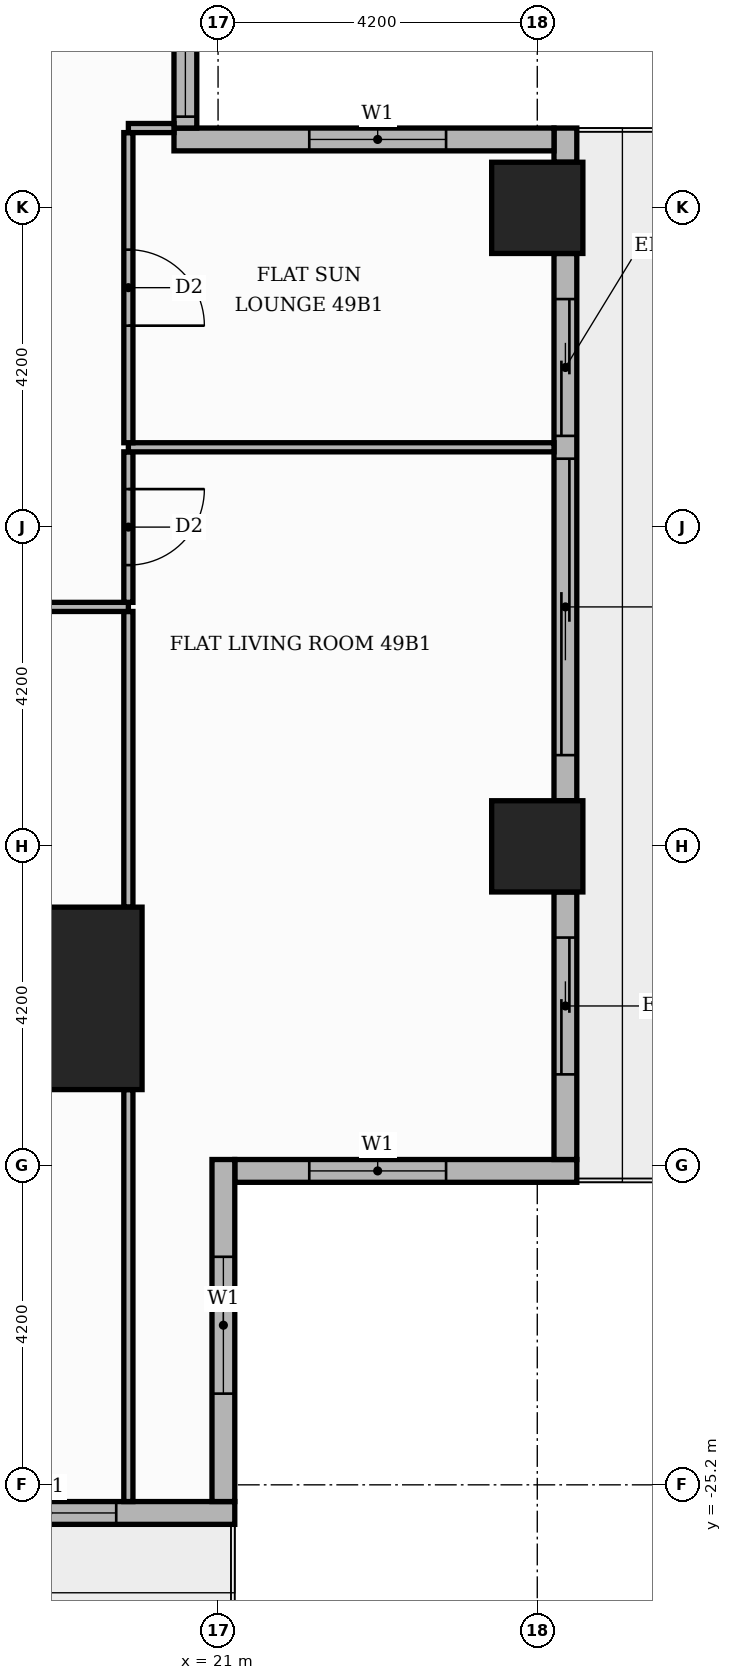
"""IFC4 building model, lengths in metres.
Left out: names, types, materials, properties, quantities, classifications, styles, units other than length and angle.
Written with IfcOpenShell. Run it as: python <this file> out.ifc"""

import sys

from ifc_helpers import new_model, si_unit, direction, frame, frame_2d, origin, origin_2d, place, context, subcontext, project, spatial, rectangle, extrude, element, fill, save


model = new_model("IFC4")
c1 = context("Model", 3, precision=1e-05, world=origin(), true_north=direction((0.0, 1.0)))
c2 = subcontext(c1, "Body", "Model", "MODEL_VIEW")
j1 = project(units=[si_unit("LENGTHUNIT", "METRE"), si_unit("PLANEANGLEUNIT", "RADIAN")], contexts=[c1])
p1 = place(None, origin())
s1 = spatial("IfcSite", under=j1, at=p1, CompositionType="ELEMENT")
p2 = place(p1, origin())
s2 = spatial("IfcBuilding", under=s1, at=p2, CompositionType="ELEMENT")
p3 = place(p2, frame((0.0, 0.0, 207.9)))
s3 = spatial("IfcBuildingStorey", under=s2, at=p3, CompositionType="ELEMENT", Elevation=207.9)
p4 = place(p3, frame((18.8, -18.8, 0.0), z_axis=(0.0, 0.0, 1.0), x_axis=(1.0, 0.0, 0.0)))
e1 = element("IfcColumn", 1, at=p4, inside=s3, PredefinedType="COLUMN", context=c2, shape_type="SweptSolid", body=[
    extrude(rectangle(XDim=2.4, YDim=2.4, at=origin_2d()), origin(), (0.0, 0.0, 1.0), 3.9),
])
for number, where, z_axis, x_axis in (
    (2, (25.2, -8.4, 0.0), (0.0, 0.0, 1.0), (1.0, 0.0, 0.0)),
    (3, (25.2, -16.8, 0.0), (0.0, 0.0, 1.0), (1.0, 0.0, 0.0)),
):
    element("IfcColumn", number, at=place(p3, frame(where, z_axis=z_axis, x_axis=x_axis)), inside=s3, PredefinedType="COLUMN", context=c2, shape_type="SweptSolid", body=[
        extrude(rectangle(XDim=1.2, YDim=1.2, at=origin_2d()), origin(), (0.0, 0.0, 1.0), 3.9),
    ])
p5 = place(p3, frame((21.22, -21.07, 0.0), z_axis=(0.0, 0.0, 1.0), x_axis=(1.0, 0.0, 0.0)))
e4 = element("IfcWall", 4, at=p5, inside=s3, PredefinedType="STANDARD", context=c2, shape_type="SweptSolid", body=[
    extrude(rectangle(XDim=4.5, YDim=0.3, at=frame_2d((2.25, 0.0))), origin(), (0.0, 0.0, 1.0), 3.48),
])
p6 = place(p5, frame((0.98, 0.0, 0.9)))
e5 = element("IfcOpeningElement", 5, at=p6, cuts=e4, PredefinedType="OPENING", context=c2, shape_type="SweptSolid", body=[
    extrude(rectangle(XDim=1.8, YDim=2.1, at=frame_2d((0.9, 1.05))), frame((0.0, 0.16, 0.0), z_axis=(0.0, -1.0, 0.0), x_axis=(1.0, 0.0, 0.0)), (0.0, 0.0, 1.0), 0.32),
])
p7 = place(p3, frame((25.57, -20.92, 0.0), z_axis=(0.0, 0.0, 1.0), x_axis=(0.0, 1.0, 0.0)))
e6 = element("IfcWall", 6, at=p7, inside=s3, PredefinedType="STANDARD", context=c2, shape_type="SweptSolid", body=[
    extrude(rectangle(XDim=3.52, YDim=0.3, at=frame_2d((1.76, 0.0))), origin(), (0.0, 0.0, 1.0), 3.48),
])
p8 = place(p7, frame((1.12, 0.0, 0.0)))
e7 = element("IfcOpeningElement", 7, at=p8, cuts=e6, PredefinedType="OPENING", context=c2, shape_type="SweptSolid", body=[
    extrude(rectangle(XDim=1.8, YDim=2.4, at=frame_2d((0.9, 1.2))), frame((0.0, 0.16, 0.0), z_axis=(0.0, -1.0, 0.0), x_axis=(1.0, 0.0, 0.0)), (0.0, 0.0, 1.0), 0.32),
])
p9 = place(p3, frame((25.57, -16.2, 0.0), z_axis=(0.0, 0.0, 1.0), x_axis=(0.0, 1.0, 0.0)))
e8 = element("IfcWall", 8, at=p9, inside=s3, PredefinedType="STANDARD", context=c2, shape_type="SweptSolid", body=[
    extrude(rectangle(XDim=7.2, YDim=0.3, at=frame_2d((3.6, 0.0))), origin(), (0.0, 0.0, 1.0), 3.48),
])
p10 = place(p9, frame((0.6, 0.0, 0.0)))
e9 = element("IfcOpeningElement", 9, at=p10, cuts=e8, PredefinedType="OPENING", context=c2, shape_type="SweptSolid", body=[
    extrude(rectangle(XDim=3.9, YDim=2.4, at=frame_2d((1.95, 1.2))), frame((0.0, 0.16, 0.0), z_axis=(0.0, -1.0, 0.0), x_axis=(1.0, 0.0, 0.0)), (0.0, 0.0, 1.0), 0.32),
])
p11 = place(p9, frame((4.8, 0.0, 0.0)))
e10 = element("IfcOpeningElement", 10, at=p11, cuts=e8, PredefinedType="OPENING", context=c2, shape_type="SweptSolid", body=[
    extrude(rectangle(XDim=1.8, YDim=2.4, at=frame_2d((0.9, 1.2))), frame((0.0, 0.16, 0.0), z_axis=(0.0, -1.0, 0.0), x_axis=(1.0, 0.0, 0.0)), (0.0, 0.0, 1.0), 0.32),
])
p12 = place(p3, frame((25.57, -7.8, 0.0), z_axis=(0.0, 0.0, 1.0), x_axis=(0.0, 1.0, 0.0)))
e11 = element("IfcWall", 11, at=p12, inside=s3, PredefinedType="STANDARD", context=c2, shape_type="SweptSolid", body=[
    extrude(rectangle(XDim=0.45, YDim=0.3, at=frame_2d((0.225, 0.0))), origin(), (0.0, 0.0, 1.0), 3.48),
])
p13 = place(p3, frame((25.42, -7.5, 0.0), z_axis=(0.0, 0.0, 1.0), x_axis=(-1.0, 0.0, 0.0)))
e12 = element("IfcWall", 12, at=p13, inside=s3, PredefinedType="STANDARD", context=c2, shape_type="SweptSolid", body=[
    extrude(rectangle(XDim=5.0, YDim=0.3, at=frame_2d((2.5, 0.0))), origin(), (0.0, 0.0, 1.0), 3.48),
])
p14 = place(p13, frame((1.42, 0.0, 0.9)))
e13 = element("IfcOpeningElement", 13, at=p14, cuts=e12, PredefinedType="OPENING", context=c2, shape_type="SweptSolid", body=[
    extrude(rectangle(XDim=1.8, YDim=2.1, at=frame_2d((0.9, 1.05))), frame((0.0, 0.16, 0.0), z_axis=(0.0, -1.0, 0.0), x_axis=(1.0, 0.0, 0.0)), (0.0, 0.0, 1.0), 0.32),
])
p15 = place(p3, frame((20.57, -7.35, 0.0), z_axis=(0.0, 0.0, 1.0), x_axis=(0.0, 1.0, 0.0)))
e14 = element("IfcWall", 14, at=p15, inside=s3, PredefinedType="STANDARD", context=c2, shape_type="SweptSolid", body=[
    extrude(rectangle(XDim=15.0, YDim=0.3, at=frame_2d((7.5, 0.0))), origin(), (0.0, 0.0, 1.0), 3.48),
])
p16 = place(p15, frame((0.15, 0.0, 0.9)))
e15 = element("IfcOpeningElement", 15, at=p16, cuts=e14, PredefinedType="OPENING", context=c2, shape_type="SweptSolid", body=[
    extrude(rectangle(XDim=6.0, YDim=2.1, at=frame_2d((3.0, 1.05))), frame((0.0, 0.16, 0.0), z_axis=(0.0, -1.0, 0.0), x_axis=(1.0, 0.0, 0.0)), (0.0, 0.0, 1.0), 0.32),
])
p17 = place(p15, frame((6.45, 0.0, 0.9)))
e16 = element("IfcOpeningElement", 16, at=p17, cuts=e14, PredefinedType="OPENING", context=c2, shape_type="SweptSolid", body=[
    extrude(rectangle(XDim=6.0, YDim=2.1, at=frame_2d((3.0, 1.05))), frame((0.0, 0.16, 0.0), z_axis=(0.0, -1.0, 0.0), x_axis=(1.0, 0.0, 0.0)), (0.0, 0.0, 1.0), 0.32),
])
p18 = place(p15, frame((12.75, 0.0, 0.9)))
e17 = element("IfcOpeningElement", 17, at=p18, cuts=e14, PredefinedType="OPENING", context=c2, shape_type="SweptSolid", body=[
    extrude(rectangle(XDim=1.8, YDim=2.1, at=frame_2d((0.9, 1.05))), frame((0.0, 0.16, 0.0), z_axis=(0.0, -1.0, 0.0), x_axis=(1.0, 0.0, 0.0)), (0.0, 0.0, 1.0), 0.32),
])
p19 = place(p3, frame((17.4, -25.57, 0.0), z_axis=(0.0, 0.0, 1.0), x_axis=(1.0, 0.0, 0.0)))
e18 = element("IfcWall", 18, at=p19, inside=s3, PredefinedType="STANDARD", context=c2, shape_type="SweptSolid", body=[
    extrude(rectangle(XDim=3.82, YDim=0.3, at=frame_2d((1.91, 0.0))), origin(), (0.0, 0.0, 1.0), 3.48),
])
p20 = place(p19, frame((0.46, 0.0, 0.9)))
e19 = element("IfcOpeningElement", 19, at=p20, cuts=e18, PredefinedType="OPENING", context=c2, shape_type="SweptSolid", body=[
    extrude(rectangle(XDim=1.8, YDim=2.1, at=frame_2d((0.9, 1.05))), frame((0.0, 0.16, 0.0), z_axis=(0.0, -1.0, 0.0), x_axis=(1.0, 0.0, 0.0)), (0.0, 0.0, 1.0), 0.32),
])
p21 = place(p3, frame((21.07, -25.42, 0.0), z_axis=(0.0, 0.0, 1.0), x_axis=(0.0, 1.0, 0.0)))
e20 = element("IfcWall", 20, at=p21, inside=s3, PredefinedType="STANDARD", context=c2, shape_type="SweptSolid", body=[
    extrude(rectangle(XDim=4.5, YDim=0.3, at=frame_2d((2.25, 0.0))), origin(), (0.0, 0.0, 1.0), 3.48),
])
p22 = place(p21, frame((1.42, 0.0, 0.9)))
e21 = element("IfcOpeningElement", 21, at=p22, cuts=e20, PredefinedType="OPENING", context=c2, shape_type="SweptSolid", body=[
    extrude(rectangle(XDim=1.8, YDim=2.1, at=frame_2d((0.9, 1.05))), frame((0.0, 0.16, 0.0), z_axis=(0.0, -1.0, 0.0), x_axis=(1.0, 0.0, 0.0)), (0.0, 0.0, 1.0), 0.32),
])
p23 = place(p3, frame((19.82, -25.42, 0.0), z_axis=(0.0, 0.0, 1.0), x_axis=(0.0, 1.0, 0.0)))
e22 = element("IfcWall", 22, at=p23, inside=s3, PredefinedType="PARTITIONING", context=c2, shape_type="SweptSolid", body=[
    extrude(rectangle(XDim=5.42, YDim=0.12, at=frame_2d((2.71, 0.0))), origin(), (0.0, 0.0, 1.0), 3.48),
])
p24 = place(p3, frame((19.82, -17.6, 0.0), z_axis=(0.0, 0.0, 1.0), x_axis=(0.0, 1.0, 0.0)))
e23 = element("IfcWall", 23, at=p24, inside=s3, PredefinedType="PARTITIONING", context=c2, shape_type="SweptSolid", body=[
    extrude(rectangle(XDim=3.89, YDim=0.12, at=frame_2d((1.945, 0.0))), origin(), (0.0, 0.0, 1.0), 3.48),
])
p25 = place(p3, frame((13.65, -13.65, 0.0), z_axis=(0.0, 0.0, 1.0), x_axis=(1.0, 0.0, 0.0)))
e24 = element("IfcWall", 24, at=p25, inside=s3, PredefinedType="PARTITIONING", context=c2, shape_type="SweptSolid", body=[
    extrude(rectangle(XDim=6.17, YDim=0.12, at=frame_2d((3.085, 0.0))), origin(), (0.0, 0.0, 1.0), 3.48),
])
p26 = place(p25, frame((2.635, 0.0, 0.0)))
e25 = element("IfcOpeningElement", 25, at=p26, cuts=e24, PredefinedType="OPENING", context=c2, shape_type="SweptSolid", body=[
    extrude(rectangle(XDim=0.9, YDim=2.1, at=frame_2d((0.45, 1.05))), frame((0.0, 0.07, 0.0), z_axis=(0.0, -1.0, 0.0), x_axis=(1.0, 0.0, 0.0)), (0.0, 0.0, 1.0), 0.14),
])
p27 = place(p3, frame((19.82, -13.59, 0.0), z_axis=(0.0, 0.0, 1.0), x_axis=(0.0, 1.0, 0.0)))
e26 = element("IfcWall", 26, at=p27, inside=s3, PredefinedType="PARTITIONING", context=c2, shape_type="SweptSolid", body=[
    extrude(rectangle(XDim=1.98, YDim=0.12, at=frame_2d((0.99, 0.0))), origin(), (0.0, 0.0, 1.0), 3.48),
])
p28 = place(p27, frame((0.49, 0.0, 0.0)))
e27 = element("IfcOpeningElement", 27, at=p28, cuts=e26, PredefinedType="OPENING", context=c2, shape_type="SweptSolid", body=[
    extrude(rectangle(XDim=1.0, YDim=2.1, at=frame_2d((0.5, 1.05))), frame((0.0, 0.07, 0.0), z_axis=(0.0, -1.0, 0.0), x_axis=(1.0, 0.0, 0.0)), (0.0, 0.0, 1.0), 0.14),
])
p29 = place(p3, frame((19.82, -11.55, 0.0), z_axis=(0.0, 0.0, 1.0), x_axis=(1.0, 0.0, 0.0)))
e28 = element("IfcWall", 28, at=p29, inside=s3, PredefinedType="PARTITIONING", context=c2, shape_type="SweptSolid", body=[
    extrude(rectangle(XDim=5.6, YDim=0.12, at=frame_2d((2.8, 0.0))), origin(), (0.0, 0.0, 1.0), 3.48),
])
p30 = place(p3, frame((19.82, -11.49, 0.0), z_axis=(0.0, 0.0, 1.0), x_axis=(0.0, 1.0, 0.0)))
e29 = element("IfcWall", 29, at=p30, inside=s3, PredefinedType="PARTITIONING", context=c2, shape_type="SweptSolid", body=[
    extrude(rectangle(XDim=4.08, YDim=0.12, at=frame_2d((2.04, 0.0))), origin(), (0.0, 0.0, 1.0), 3.48),
])
p31 = place(p30, frame((1.54, 0.0, 0.0)))
e30 = element("IfcOpeningElement", 30, at=p31, cuts=e29, PredefinedType="OPENING", context=c2, shape_type="SweptSolid", body=[
    extrude(rectangle(XDim=1.0, YDim=2.1, at=frame_2d((0.5, 1.05))), frame((0.0, 0.07, 0.0), z_axis=(0.0, -1.0, 0.0), x_axis=(1.0, 0.0, 0.0)), (0.0, 0.0, 1.0), 0.14),
])
p32 = place(p3, frame((19.82, -7.35, 0.0), z_axis=(0.0, 0.0, 1.0), x_axis=(1.0, 0.0, 0.0)))
e31 = element("IfcWall", 31, at=p32, inside=s3, PredefinedType="PARTITIONING", context=c2, shape_type="SweptSolid", body=[
    extrude(rectangle(XDim=0.6, YDim=0.12, at=frame_2d((0.3, 0.0))), origin(), (0.0, 0.0, 1.0), 3.48),
])
p33 = place(p6, origin())
e32 = element("IfcWindow", 32, at=p33, inside=s3, PartitioningType="SINGLE_PANEL", PredefinedType="WINDOW", context=c2, shape_type="SweptSolid", body=[
    extrude(rectangle(XDim=1.8, YDim=2.1, at=frame_2d((0.9, 1.05))), frame((0.0, 0.03, 0.0), z_axis=(0.0, -1.0, 0.0), x_axis=(1.0, 0.0, 0.0)), (0.0, 0.0, 1.0), 0.06),
])
fill(e5, e32)
p34 = place(p8, origin())
e33 = element("IfcDoor", 33, at=p34, inside=s3, OperationType="SLIDING_TO_RIGHT", PredefinedType="DOOR", context=c2, shape_type="SweptSolid", body=[
    extrude(rectangle(XDim=1.8, YDim=2.4, at=frame_2d((0.9, 1.2))), frame((0.0, 0.025, 0.0), z_axis=(0.0, -1.0, 0.0), x_axis=(1.0, 0.0, 0.0)), (0.0, 0.0, 1.0), 0.05),
])
fill(e7, e33)
p35 = place(p10, origin())
e34 = element("IfcDoor", 34, at=p35, inside=s3, OperationType="SLIDING_TO_LEFT", PredefinedType="DOOR", context=c2, shape_type="SweptSolid", body=[
    extrude(rectangle(XDim=3.9, YDim=2.4, at=frame_2d((1.95, 1.2))), frame((0.0, 0.025, 0.0), z_axis=(0.0, -1.0, 0.0), x_axis=(1.0, 0.0, 0.0)), (0.0, 0.0, 1.0), 0.05),
])
fill(e9, e34)
p36 = place(p11, origin())
e35 = element("IfcDoor", 35, at=p36, inside=s3, OperationType="SLIDING_TO_RIGHT", PredefinedType="DOOR", context=c2, shape_type="SweptSolid", body=[
    extrude(rectangle(XDim=1.8, YDim=2.4, at=frame_2d((0.9, 1.2))), frame((0.0, 0.025, 0.0), z_axis=(0.0, -1.0, 0.0), x_axis=(1.0, 0.0, 0.0)), (0.0, 0.0, 1.0), 0.05),
])
fill(e10, e35)
p37 = place(p14, origin())
e36 = element("IfcWindow", 36, at=p37, inside=s3, PartitioningType="SINGLE_PANEL", PredefinedType="WINDOW", context=c2, shape_type="SweptSolid", body=[
    extrude(rectangle(XDim=1.8, YDim=2.1, at=frame_2d((0.9, 1.05))), frame((0.0, 0.03, 0.0), z_axis=(0.0, -1.0, 0.0), x_axis=(1.0, 0.0, 0.0)), (0.0, 0.0, 1.0), 0.06),
])
fill(e13, e36)
p38 = place(p16, origin())
e37 = element("IfcWindow", 37, at=p38, inside=s3, PartitioningType="SINGLE_PANEL", PredefinedType="WINDOW", context=c2, shape_type="SweptSolid", body=[
    extrude(rectangle(XDim=6.0, YDim=2.1, at=frame_2d((3.0, 1.05))), frame((0.0, 0.03, 0.0), z_axis=(0.0, -1.0, 0.0), x_axis=(1.0, 0.0, 0.0)), (0.0, 0.0, 1.0), 0.06),
])
fill(e15, e37)
p39 = place(p20, origin())
e38 = element("IfcWindow", 38, at=p39, inside=s3, PartitioningType="SINGLE_PANEL", PredefinedType="WINDOW", context=c2, shape_type="SweptSolid", body=[
    extrude(rectangle(XDim=1.8, YDim=2.1, at=frame_2d((0.9, 1.05))), frame((0.0, 0.03, 0.0), z_axis=(0.0, -1.0, 0.0), x_axis=(1.0, 0.0, 0.0)), (0.0, 0.0, 1.0), 0.06),
])
fill(e19, e38)
p40 = place(p22, origin())
e39 = element("IfcWindow", 39, at=p40, inside=s3, PartitioningType="SINGLE_PANEL", PredefinedType="WINDOW", context=c2, shape_type="SweptSolid", body=[
    extrude(rectangle(XDim=1.8, YDim=2.1, at=frame_2d((0.9, 1.05))), frame((0.0, 0.03, 0.0), z_axis=(0.0, -1.0, 0.0), x_axis=(1.0, 0.0, 0.0)), (0.0, 0.0, 1.0), 0.06),
])
fill(e21, e39)
p41 = place(p28, frame((1.0, 0.0, 0.0), z_axis=(0.0, 0.0, 1.0), x_axis=(-1.0, 0.0, 0.0)))
e40 = element("IfcDoor", 40, at=p41, inside=s3, OperationType="SINGLE_SWING_RIGHT", PredefinedType="DOOR", context=c2, shape_type="SweptSolid", body=[
    extrude(rectangle(XDim=1.0, YDim=2.1, at=frame_2d((0.5, 1.05))), frame((0.0, 0.025, 0.0), z_axis=(0.0, -1.0, 0.0), x_axis=(1.0, 0.0, 0.0)), (0.0, 0.0, 1.0), 0.05),
])
fill(e27, e40)
p42 = place(p31, frame((1.0, 0.0, 0.0), z_axis=(0.0, 0.0, 1.0), x_axis=(-1.0, 0.0, 0.0)))
e41 = element("IfcDoor", 41, at=p42, inside=s3, OperationType="SINGLE_SWING_LEFT", PredefinedType="DOOR", context=c2, shape_type="SweptSolid", body=[
    extrude(rectangle(XDim=1.0, YDim=2.1, at=frame_2d((0.5, 1.05))), frame((0.0, 0.025, 0.0), z_axis=(0.0, -1.0, 0.0), x_axis=(1.0, 0.0, 0.0)), (0.0, 0.0, 1.0), 0.05),
])
fill(e30, e41)
save(model, sys.argv[1])
